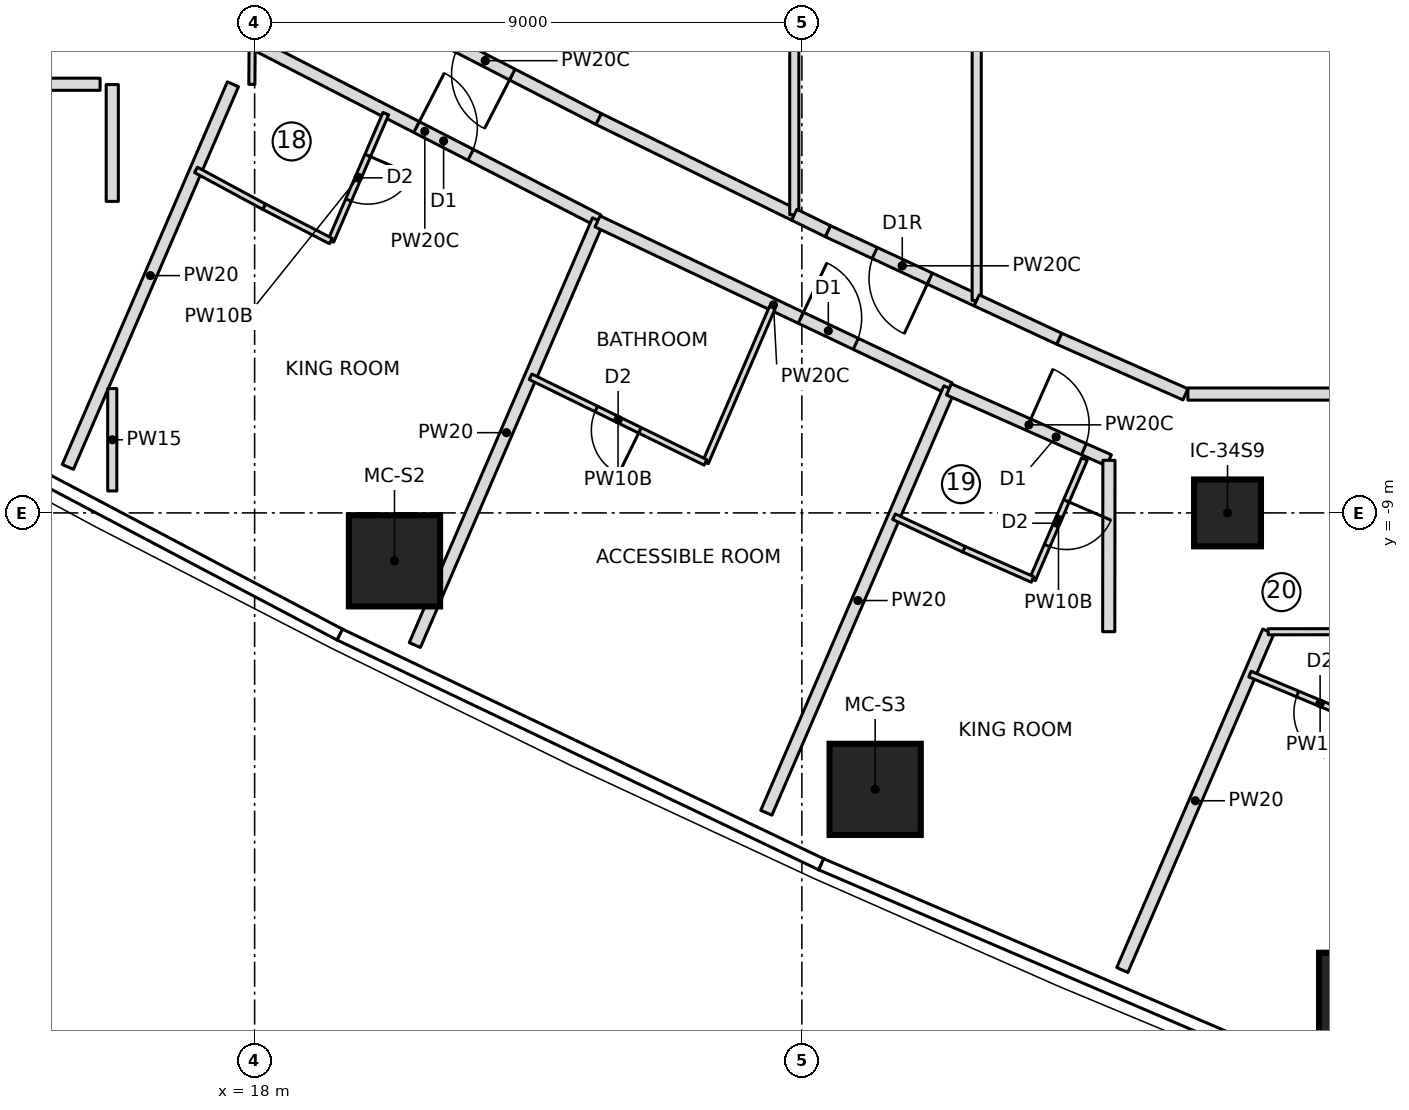
"""IFC4 building model, lengths in metres.
Left out: names, types, materials, properties, quantities, classifications, styles, units other than length and angle.
Written with IfcOpenShell. Run it as: python <this file> out.ifc"""

import sys

from ifc_helpers import new_model, si_unit, direction, frame, frame_2d, origin, origin_2d, place, context, subcontext, project, spatial, rectangle, extrude, element, fill, save


model = new_model("IFC4")
c1 = context("Model", 3, precision=1e-05, world=origin(), true_north=direction((0.0, 1.0)))
c2 = subcontext(c1, "Body", "Model", "MODEL_VIEW")
j1 = project(units=[si_unit("LENGTHUNIT", "METRE"), si_unit("PLANEANGLEUNIT", "RADIAN")], contexts=[c1])
p1 = place(None, origin())
s1 = spatial("IfcSite", under=j1, at=p1, CompositionType="ELEMENT")
p2 = place(p1, origin())
s2 = spatial("IfcBuilding", under=s1, at=p2, CompositionType="ELEMENT")
p3 = place(p2, frame((0.0, 0.0, 151.5)))
s3 = spatial("IfcBuildingStorey", under=s2, at=p3, CompositionType="ELEMENT", Elevation=151.5)
for number, where, z_axis, x_axis in (
    (1, (20.3, -9.788, 0.0), (0.0, 0.0, 1.0), (1.0, 0.0, 0.0)),
    (2, (28.205, -13.547, 0.0), (0.0, 0.0, 1.0), (1.0, 0.0, 0.0)),
    (3, (36.256, -16.984, 0.0), (0.0, 0.0, 1.0), (1.0, 0.0, 0.0)),
):
    element("IfcColumn", number, at=place(p3, frame(where, z_axis=z_axis, x_axis=x_axis)), inside=s3, PredefinedType="COLUMN", context=c2, shape_type="SweptSolid", body=[
        extrude(rectangle(XDim=1.5, YDim=1.5, at=origin_2d()), origin(), (0.0, 0.0, 1.0), 3.55),
    ])
p4 = place(p3, frame((34.0, -9.0, 0.0), z_axis=(0.0, 0.0, 1.0), x_axis=(1.0, 0.0, 0.0)))
e4 = element("IfcColumn", 4, at=p4, inside=s3, PredefinedType="COLUMN", context=c2, shape_type="SweptSolid", body=[
    extrude(rectangle(XDim=1.1, YDim=1.1, at=origin_2d()), origin(), (0.0, 0.0, 1.0), 3.55),
])
p5 = place(p3, frame((5.654, -1.95, 0.0), z_axis=(0.0, 0.0, 1.0), x_axis=(1.0, 0.0, 0.0)))
e5 = element("IfcWall", 5, at=p5, inside=s3, PredefinedType="PARTITIONING", context=c2, shape_type="SweptSolid", body=[
    extrude(rectangle(XDim=9.804, YDim=0.2, at=frame_2d((4.902, 0.0))), origin(), (0.0, 0.0, 1.0), 3.25),
])
p6 = place(p5, frame((4.618, 0.0, 0.0)))
e6 = element("IfcOpeningElement", 6, at=p6, cuts=e5, PredefinedType="OPENING", context=c2, shape_type="SweptSolid", body=[
    extrude(rectangle(XDim=1.0, YDim=2.1, at=frame_2d((0.5, 1.05))), frame((0.0, 0.11, 0.0), z_axis=(0.0, -1.0, 0.0), x_axis=(1.0, 0.0, 0.0)), (0.0, 0.0, 1.0), 0.22),
])
p7 = place(p3, frame((14.929, -8.244, 0.0), z_axis=(0.0, 0.0, 1.0), x_axis=(0.395994543879, 0.918252863441, 0.0)))
e7 = element("IfcWall", 7, at=p7, inside=s3, PredefinedType="PARTITIONING", context=c2, shape_type="SweptSolid", body=[
    extrude(rectangle(XDim=6.854, YDim=0.2, at=frame_2d((3.427, 0.0))), origin(), (0.0, 0.0, 1.0), 3.25),
])
p8 = place(p3, frame((17.95, -1.261, 0.0), z_axis=(0.0, 0.0, 1.0), x_axis=(0.889557809153, -0.456822617845, 0.0)))
e8 = element("IfcWall", 8, at=p8, inside=s3, PredefinedType="PARTITIONING", context=c2, shape_type="SweptSolid", body=[
    extrude(rectangle(XDim=6.406, YDim=0.2, at=frame_2d((3.203, 0.0))), origin(), (0.0, 0.0, 1.0), 3.25),
])
p9 = place(p8, frame((3.05, 0.0, 0.0)))
e9 = element("IfcOpeningElement", 9, at=p9, cuts=e8, PredefinedType="OPENING", context=c2, shape_type="SweptSolid", body=[
    extrude(rectangle(XDim=1.0, YDim=2.1, at=frame_2d((0.5, 1.05))), frame((0.0, 0.11, 0.0), z_axis=(0.0, -1.0, 0.0), x_axis=(1.0, 0.0, 0.0)), (0.0, 0.0, 1.0), 0.22),
])
p10 = place(p3, frame((20.157, -2.433, 0.0), z_axis=(0.0, 0.0, 1.0), x_axis=(-0.395958457437, -0.9182684248, 0.0)))
e10 = element("IfcWall", 10, at=p10, inside=s3, PredefinedType="PARTITIONING", context=c2, shape_type="SweptSolid", body=[
    extrude(rectangle(XDim=2.282, YDim=0.1, at=frame_2d((1.141, 0.0))), origin(), (0.0, 0.0, 1.0), 3.25),
])
p11 = place(p10, frame((0.75, 0.0, 0.0)))
e11 = element("IfcOpeningElement", 11, at=p11, cuts=e10, PredefinedType="OPENING", context=c2, shape_type="SweptSolid", body=[
    extrude(rectangle(XDim=0.8, YDim=2.1, at=frame_2d((0.4, 1.05))), frame((0.0, 0.06, 0.0), z_axis=(0.0, -1.0, 0.0), x_axis=(1.0, 0.0, 0.0)), (0.0, 0.0, 1.0), 0.12),
])
p12 = place(p3, frame((19.253, -4.529, 0.0), z_axis=(0.0, 0.0, 1.0), x_axis=(-0.889106231322, 0.457700895154, 0.0)))
e12 = element("IfcWall", 12, at=p12, inside=s3, PredefinedType="PARTITIONING", context=c2, shape_type="SweptSolid", body=[
    extrude(rectangle(XDim=1.235, YDim=0.1, at=frame_2d((0.617, 0.0))), origin(), (0.0, 0.0, 1.0), 3.25),
])
p13 = place(p3, frame((18.156, -3.963, 0.0), z_axis=(0.0, 0.0, 1.0), x_axis=(-0.879823588489, 0.475300382009, 0.0)))
e13 = element("IfcWall", 13, at=p13, inside=s3, PredefinedType="PARTITIONING", context=c2, shape_type="SweptSolid", body=[
    extrude(rectangle(XDim=1.273, YDim=0.1, at=frame_2d((0.636, 0.0))), origin(), (0.0, 0.0, 1.0), 3.25),
])
p14 = place(p3, frame((20.635, -11.174, 0.0), z_axis=(0.0, 0.0, 1.0), x_axis=(0.396021090347, 0.91824141488, 0.0)))
e14 = element("IfcWall", 14, at=p14, inside=s3, PredefinedType="PARTITIONING", context=c2, shape_type="SweptSolid", body=[
    extrude(rectangle(XDim=7.609, YDim=0.2, at=frame_2d((3.804, 0.0))), origin(), (0.0, 0.0, 1.0), 3.25),
])
p15 = place(p3, frame((23.64, -4.205, 0.0), z_axis=(0.0, 0.0, 1.0), x_axis=(0.90349162151, -0.428605751082, 0.0)))
e15 = element("IfcWall", 15, at=p15, inside=s3, PredefinedType="PARTITIONING", context=c2, shape_type="SweptSolid", body=[
    extrude(rectangle(XDim=6.404, YDim=0.2, at=frame_2d((3.202, 0.0))), origin(), (0.0, 0.0, 1.0), 3.25),
])
p16 = place(p15, frame((3.7, 0.0, 0.0)))
e16 = element("IfcOpeningElement", 16, at=p16, cuts=e15, PredefinedType="OPENING", context=c2, shape_type="SweptSolid", body=[
    extrude(rectangle(XDim=1.0, YDim=2.1, at=frame_2d((0.5, 1.05))), frame((0.0, 0.11, 0.0), z_axis=(0.0, -1.0, 0.0), x_axis=(1.0, 0.0, 0.0)), (0.0, 0.0, 1.0), 0.22),
])
p17 = place(p3, frame((26.516, -5.617, 0.0), z_axis=(0.0, 0.0, 1.0), x_axis=(-0.395985125724, -0.918256924943, 0.0)))
e17 = element("IfcWall", 17, at=p17, inside=s3, PredefinedType="PARTITIONING", context=c2, shape_type="SweptSolid", body=[
    extrude(rectangle(XDim=2.78, YDim=0.1, at=frame_2d((1.39, 0.0))), origin(), (0.0, 0.0, 1.0), 3.25),
])
p18 = place(p3, frame((25.415, -8.169, 0.0), z_axis=(0.0, 0.0, 1.0), x_axis=(-0.898160376677, 0.439667985834, 0.0)))
e18 = element("IfcWall", 18, at=p18, inside=s3, PredefinedType="PARTITIONING", context=c2, shape_type="SweptSolid", body=[
    extrude(rectangle(XDim=3.203, YDim=0.1, at=frame_2d((1.602, 0.0))), origin(), (0.0, 0.0, 1.0), 3.25),
])
p19 = place(p18, frame((1.2, 0.0, 0.0)))
e19 = element("IfcOpeningElement", 19, at=p19, cuts=e18, PredefinedType="OPENING", context=c2, shape_type="SweptSolid", body=[
    extrude(rectangle(XDim=0.8, YDim=2.1, at=frame_2d((0.4, 1.05))), frame((0.0, 0.06, 0.0), z_axis=(0.0, -1.0, 0.0), x_axis=(1.0, 0.0, 0.0)), (0.0, 0.0, 1.0), 0.12),
])
p20 = place(p3, frame((26.416, -13.931, 0.0), z_axis=(0.0, 0.0, 1.0), x_axis=(0.396007233012, 0.918247391176, 0.0)))
e20 = element("IfcWall", 20, at=p20, inside=s3, PredefinedType="PARTITIONING", context=c2, shape_type="SweptSolid", body=[
    extrude(rectangle(XDim=7.603, YDim=0.2, at=frame_2d((3.801, 0.0))), origin(), (0.0, 0.0, 1.0), 3.25),
])
p21 = place(p3, frame((29.418, -6.969, 0.0), z_axis=(0.0, 0.0, 1.0), x_axis=(0.914223747947, -0.405209746539, 0.0)))
e21 = element("IfcWall", 21, at=p21, inside=s3, PredefinedType="PARTITIONING", context=c2, shape_type="SweptSolid", body=[
    extrude(rectangle(XDim=2.879, YDim=0.2, at=frame_2d((1.439, 0.0))), origin(), (0.0, 0.0, 1.0), 3.25),
])
p22 = place(p21, frame((1.429, 0.0, 0.0)))
e22 = element("IfcOpeningElement", 22, at=p22, cuts=e21, PredefinedType="OPENING", context=c2, shape_type="SweptSolid", body=[
    extrude(rectangle(XDim=1.0, YDim=2.1, at=frame_2d((0.5, 1.05))), frame((0.0, 0.11, 0.0), z_axis=(0.0, -1.0, 0.0), x_axis=(1.0, 0.0, 0.0)), (0.0, 0.0, 1.0), 0.22),
])
p23 = place(p3, frame((31.647, -8.114, 0.0), z_axis=(0.0, 0.0, 1.0), x_axis=(-0.395926443446, -0.91828222861, 0.0)))
e23 = element("IfcWall", 23, at=p23, inside=s3, PredefinedType="PARTITIONING", context=c2, shape_type="SweptSolid", body=[
    extrude(rectangle(XDim=2.157, YDim=0.1, at=frame_2d((1.079, 0.0))), origin(), (0.0, 0.0, 1.0), 3.25),
])
p24 = place(p23, frame((0.75, 0.0, 0.0)))
e24 = element("IfcOpeningElement", 24, at=p24, cuts=e23, PredefinedType="OPENING", context=c2, shape_type="SweptSolid", body=[
    extrude(rectangle(XDim=0.8, YDim=2.1, at=frame_2d((0.4, 1.05))), frame((0.0, 0.06, 0.0), z_axis=(0.0, -1.0, 0.0), x_axis=(1.0, 0.0, 0.0)), (0.0, 0.0, 1.0), 0.12),
])
p25 = place(p3, frame((30.793, -10.094, 0.0), z_axis=(0.0, 0.0, 1.0), x_axis=(-0.915072564462, 0.403289228431, 0.0)))
e25 = element("IfcWall", 25, at=p25, inside=s3, PredefinedType="PARTITIONING", context=c2, shape_type="SweptSolid", body=[
    extrude(rectangle(XDim=1.233, YDim=0.1, at=frame_2d((0.617, 0.0))), origin(), (0.0, 0.0, 1.0), 3.25),
])
p26 = place(p3, frame((29.664, -9.597, 0.0), z_axis=(0.0, 0.0, 1.0), x_axis=(-0.906856445091, 0.421439661159, 0.0)))
e26 = element("IfcWall", 26, at=p26, inside=s3, PredefinedType="PARTITIONING", context=c2, shape_type="SweptSolid", body=[
    extrude(rectangle(XDim=1.267, YDim=0.1, at=frame_2d((0.633, 0.0))), origin(), (0.0, 0.0, 1.0), 3.25),
])
p27 = place(p3, frame((32.27, -16.518, 0.0), z_axis=(0.0, 0.0, 1.0), x_axis=(0.395978622303, 0.918259729422, 0.0)))
e27 = element("IfcWall", 27, at=p27, inside=s3, PredefinedType="PARTITIONING", context=c2, shape_type="SweptSolid", body=[
    extrude(rectangle(XDim=6.064, YDim=0.2, at=frame_2d((3.032, 0.0))), origin(), (0.0, 0.0, 1.0), 3.25),
])
p28 = place(p3, frame((36.677, -12.613, 0.0), z_axis=(0.0, 0.0, 1.0), x_axis=(-0.923019129633, 0.384754059538, 0.0)))
e28 = element("IfcWall", 28, at=p28, inside=s3, PredefinedType="PARTITIONING", context=c2, shape_type="SweptSolid", body=[
    extrude(rectangle(XDim=2.5, YDim=0.1, at=frame_2d((1.25, 0.0))), origin(), (0.0, 0.0, 1.0), 3.25),
])
p29 = place(p28, frame((0.85, 0.0, 0.0)))
e29 = element("IfcOpeningElement", 29, at=p29, cuts=e28, PredefinedType="OPENING", context=c2, shape_type="SweptSolid", body=[
    extrude(rectangle(XDim=0.8, YDim=2.1, at=frame_2d((0.4, 1.05))), frame((0.0, 0.06, 0.0), z_axis=(0.0, -1.0, 0.0), x_axis=(1.0, 0.0, 0.0)), (0.0, 0.0, 1.0), 0.12),
])
p30 = place(p3, frame((23.659, -2.522, 0.0), z_axis=(0.0, 0.0, 1.0), x_axis=(-0.889140337289, 0.457634636589, 0.0)))
e30 = element("IfcWall", 30, at=p30, inside=s3, PredefinedType="PARTITIONING", context=c2, shape_type="SweptSolid", body=[
    extrude(rectangle(XDim=4.195, YDim=0.2, at=frame_2d((2.098, 0.0))), origin(), (0.0, 0.0, 1.0), 3.25),
])
p31 = place(p30, frame((1.598, 0.0, 0.0)))
e31 = element("IfcOpeningElement", 31, at=p31, cuts=e30, PredefinedType="OPENING", context=c2, shape_type="SweptSolid", body=[
    extrude(rectangle(XDim=1.0, YDim=2.1, at=frame_2d((0.5, 1.05))), frame((0.0, 0.11, 0.0), z_axis=(0.0, -1.0, 0.0), x_axis=(1.0, 0.0, 0.0)), (0.0, 0.0, 1.0), 0.22),
])
p32 = place(p3, frame((26.875, -4.096, 0.0), z_axis=(0.0, 0.0, 1.0), x_axis=(-0.898158871209, 0.439671061214, 0.0)))
e32 = element("IfcWall", 32, at=p32, inside=s3, PredefinedType="PARTITIONING", context=c2, shape_type="SweptSolid", body=[
    extrude(rectangle(XDim=3.581, YDim=0.2, at=frame_2d((1.791, 0.0))), origin(), (0.0, 0.0, 1.0), 3.25),
])
p33 = place(p3, frame((26.875, -4.096, 0.0), z_axis=(0.0, 0.0, 1.0), x_axis=(0.0, 1.0, 0.0)))
e33 = element("IfcWall", 33, at=p33, inside=s3, PredefinedType="PARTITIONING", context=c2, shape_type="SweptSolid", body=[
    extrude(rectangle(XDim=8.193, YDim=0.15, at=frame_2d((4.096, 0.0))), origin(), (0.0, 0.0, 1.0), 3.25),
])
p34 = place(p3, frame((29.875, -5.505, 0.0), z_axis=(0.0, 0.0, 1.0), x_axis=(-0.906831253463, 0.421493864419, 0.0)))
e34 = element("IfcWall", 34, at=p34, inside=s3, PredefinedType="PARTITIONING", context=c2, shape_type="SweptSolid", body=[
    extrude(rectangle(XDim=2.7, YDim=0.2, at=frame_2d((1.35, 0.0))), origin(), (0.0, 0.0, 1.0), 3.25),
])
p35 = place(p34, frame((0.85, 0.0, 0.0)))
e35 = element("IfcOpeningElement", 35, at=p35, cuts=e34, PredefinedType="OPENING", context=c2, shape_type="SweptSolid", body=[
    extrude(rectangle(XDim=1.0, YDim=2.1, at=frame_2d((0.5, 1.05))), frame((0.0, 0.11, 0.0), z_axis=(0.0, -1.0, 0.0), x_axis=(1.0, 0.0, 0.0)), (0.0, 0.0, 1.0), 0.22),
])
p36 = place(p3, frame((27.427, -4.367, 0.0), z_axis=(0.0, 0.0, 1.0), x_axis=(-0.898053097245, 0.439887070199, 0.0)))
e36 = element("IfcWall", 36, at=p36, inside=s3, PredefinedType="PARTITIONING", context=c2, shape_type="SweptSolid", body=[
    extrude(rectangle(XDim=0.615, YDim=0.2, at=frame_2d((0.307, 0.0))), origin(), (0.0, 0.0, 1.0), 3.25),
])
p37 = place(p3, frame((29.875, -5.505, 0.0), z_axis=(0.0, 0.0, 1.0), x_axis=(0.0, 1.0, 0.0)))
e37 = element("IfcWall", 37, at=p37, inside=s3, PredefinedType="PARTITIONING", context=c2, shape_type="SweptSolid", body=[
    extrude(rectangle(XDim=11.009, YDim=0.15, at=frame_2d((5.505, 0.0))), origin(), (0.0, 0.0, 1.0), 3.25),
])
p38 = place(p3, frame((33.308, -7.05, 0.0), z_axis=(0.0, 0.0, 1.0), x_axis=(-0.915102334452, 0.403221672881, 0.0)))
e38 = element("IfcWall", 38, at=p38, inside=s3, PredefinedType="PARTITIONING", context=c2, shape_type="SweptSolid", body=[
    extrude(rectangle(XDim=2.269, YDim=0.2, at=frame_2d((1.135, 0.0))), origin(), (0.0, 0.0, 1.0), 3.25),
])
p39 = place(p3, frame((31.231, -6.135, 0.0), z_axis=(0.0, 0.0, 1.0), x_axis=(-0.90682850945, 0.421499768029, 0.0)))
e39 = element("IfcWall", 39, at=p39, inside=s3, PredefinedType="PARTITIONING", context=c2, shape_type="SweptSolid", body=[
    extrude(rectangle(XDim=1.496, YDim=0.2, at=frame_2d((0.748, 0.0))), origin(), (0.0, 0.0, 1.0), 3.25),
])
p40 = place(p3, frame((15.659, -6.955, 0.0), z_axis=(0.0, 0.0, 1.0), x_axis=(0.0, -1.0, 0.0)))
e40 = element("IfcWall", 40, at=p40, inside=s3, PredefinedType="PARTITIONING", context=c2, shape_type="SweptSolid", body=[
    extrude(rectangle(XDim=1.684, YDim=0.15, at=frame_2d((0.842, 0.0))), origin(), (0.0, 0.0, 1.0), 3.25),
])
p41 = place(p3, frame((17.955, -1.952, 0.0), z_axis=(0.0, 0.0, 1.0), x_axis=(0.007291472831, 0.999973416859, 0.0)))
e41 = element("IfcWall", 41, at=p41, inside=s3, PredefinedType="PARTITIONING", context=c2, shape_type="SweptSolid", body=[
    extrude(rectangle(XDim=0.703, YDim=0.1, at=frame_2d((0.352, 0.0))), origin(), (0.0, 0.0, 1.0), 3.25),
])
p42 = place(p3, frame((34.669, -10.955, 0.0), z_axis=(0.0, 0.0, 1.0), x_axis=(0.99999954838, 0.000950389231, 0.0)))
e42 = element("IfcWall", 42, at=p42, inside=s3, PredefinedType="PARTITIONING", context=c2, shape_type="SweptSolid", body=[
    extrude(rectangle(XDim=1.284, YDim=0.1, at=frame_2d((0.642, 0.0))), origin(), (0.0, 0.0, 1.0), 3.25),
])
p43 = place(p3, frame((35.912, -7.045, 0.0), z_axis=(0.0, 0.0, 1.0), x_axis=(-0.999999981873, 0.000190403652, 0.0)))
e43 = element("IfcWall", 43, at=p43, inside=s3, PredefinedType="PARTITIONING", context=c2, shape_type="SweptSolid", body=[
    extrude(rectangle(XDim=2.564, YDim=0.2, at=frame_2d((1.282, 0.0))), origin(), (0.0, 0.0, 1.0), 3.25),
])
p44 = place(p3, frame((15.659, -1.955, 0.0), z_axis=(0.0, 0.0, 1.0), x_axis=(0.0, -1.0, 0.0)))
e44 = element("IfcWall", 44, at=p44, inside=s3, PredefinedType="PARTITIONING", context=c2, shape_type="SweptSolid", body=[
    extrude(rectangle(XDim=1.922, YDim=0.2, at=frame_2d((0.961, 0.0))), origin(), (0.0, 0.0, 1.0), 3.25),
])
p45 = place(p3, frame((32.05, -8.135, 0.0), z_axis=(0.0, 0.0, 1.0), x_axis=(-0.001299262654, -0.999999155958, 0.0)))
e45 = element("IfcWall", 45, at=p45, inside=s3, PredefinedType="PARTITIONING", context=c2, shape_type="SweptSolid", body=[
    extrude(rectangle(XDim=2.819, YDim=0.2, at=frame_2d((1.409, 0.0))), origin(), (0.0, 0.0, 1.0), 3.25),
])
p46 = place(p11, origin())
e46 = element("IfcDoor", 46, at=p46, inside=s3, OperationType="SINGLE_SWING_LEFT", PredefinedType="DOOR", context=c2, shape_type="SweptSolid", body=[
    extrude(rectangle(XDim=0.8, YDim=2.1, at=frame_2d((0.4, 1.05))), frame((0.0, 0.025, 0.0), z_axis=(0.0, -1.0, 0.0), x_axis=(1.0, 0.0, 0.0)), (0.0, 0.0, 1.0), 0.05),
])
fill(e11, e46)
p47 = place(p9, origin())
e47 = element("IfcDoor", 47, at=p47, inside=s3, OperationType="SINGLE_SWING_LEFT", PredefinedType="DOOR", context=c2, shape_type="SweptSolid", body=[
    extrude(rectangle(XDim=1.0, YDim=2.1, at=frame_2d((0.5, 1.05))), frame((0.0, 0.025, 0.0), z_axis=(0.0, -1.0, 0.0), x_axis=(1.0, 0.0, 0.0)), (0.0, 0.0, 1.0), 0.05),
])
fill(e9, e47)
p48 = place(p19, origin())
e48 = element("IfcDoor", 48, at=p48, inside=s3, OperationType="SINGLE_SWING_LEFT", PredefinedType="DOOR", context=c2, shape_type="SweptSolid", body=[
    extrude(rectangle(XDim=0.8, YDim=2.1, at=frame_2d((0.4, 1.05))), frame((0.0, 0.025, 0.0), z_axis=(0.0, -1.0, 0.0), x_axis=(1.0, 0.0, 0.0)), (0.0, 0.0, 1.0), 0.05),
])
fill(e19, e48)
p49 = place(p16, origin())
e49 = element("IfcDoor", 49, at=p49, inside=s3, OperationType="SINGLE_SWING_LEFT", PredefinedType="DOOR", context=c2, shape_type="SweptSolid", body=[
    extrude(rectangle(XDim=1.0, YDim=2.1, at=frame_2d((0.5, 1.05))), frame((0.0, 0.025, 0.0), z_axis=(0.0, -1.0, 0.0), x_axis=(1.0, 0.0, 0.0)), (0.0, 0.0, 1.0), 0.05),
])
fill(e16, e49)
p50 = place(p24, origin())
e50 = element("IfcDoor", 50, at=p50, inside=s3, OperationType="SINGLE_SWING_LEFT", PredefinedType="DOOR", context=c2, shape_type="SweptSolid", body=[
    extrude(rectangle(XDim=0.8, YDim=2.1, at=frame_2d((0.4, 1.05))), frame((0.0, 0.025, 0.0), z_axis=(0.0, -1.0, 0.0), x_axis=(1.0, 0.0, 0.0)), (0.0, 0.0, 1.0), 0.05),
])
fill(e24, e50)
p51 = place(p22, origin())
e51 = element("IfcDoor", 51, at=p51, inside=s3, OperationType="SINGLE_SWING_LEFT", PredefinedType="DOOR", context=c2, shape_type="SweptSolid", body=[
    extrude(rectangle(XDim=1.0, YDim=2.1, at=frame_2d((0.5, 1.05))), frame((0.0, 0.025, 0.0), z_axis=(0.0, -1.0, 0.0), x_axis=(1.0, 0.0, 0.0)), (0.0, 0.0, 1.0), 0.05),
])
fill(e22, e51)
p52 = place(p29, origin())
e52 = element("IfcDoor", 52, at=p52, inside=s3, OperationType="SINGLE_SWING_LEFT", PredefinedType="DOOR", context=c2, shape_type="SweptSolid", body=[
    extrude(rectangle(XDim=0.8, YDim=2.1, at=frame_2d((0.4, 1.05))), frame((0.0, 0.025, 0.0), z_axis=(0.0, -1.0, 0.0), x_axis=(1.0, 0.0, 0.0)), (0.0, 0.0, 1.0), 0.05),
])
fill(e29, e52)
p53 = place(p31, origin())
e53 = element("IfcDoor", 53, at=p53, inside=s3, OperationType="SINGLE_SWING_LEFT", PredefinedType="DOOR", context=c2, shape_type="SweptSolid", body=[
    extrude(rectangle(XDim=1.0, YDim=2.1, at=frame_2d((0.5, 1.05))), frame((0.0, 0.025, 0.0), z_axis=(0.0, -1.0, 0.0), x_axis=(1.0, 0.0, 0.0)), (0.0, 0.0, 1.0), 0.05),
])
fill(e31, e53)
p54 = place(p35, origin())
e54 = element("IfcDoor", 54, at=p54, inside=s3, OperationType="SINGLE_SWING_RIGHT", PredefinedType="DOOR", context=c2, shape_type="SweptSolid", body=[
    extrude(rectangle(XDim=1.0, YDim=2.1, at=frame_2d((0.5, 1.05))), frame((0.0, 0.025, 0.0), z_axis=(0.0, -1.0, 0.0), x_axis=(1.0, 0.0, 0.0)), (0.0, 0.0, 1.0), 0.05),
])
fill(e35, e54)
save(model, sys.argv[1])
